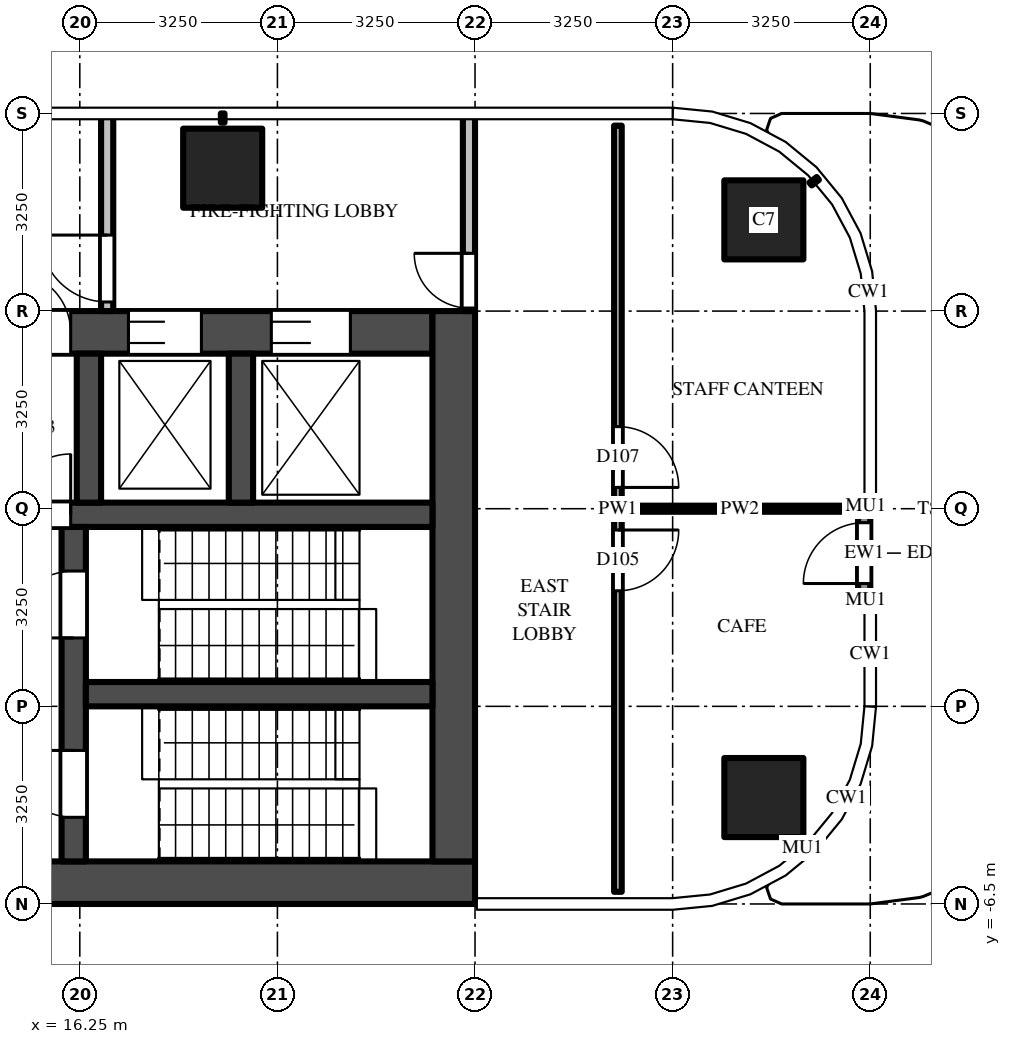
"""IFC4 building model, lengths in metres.
Left out: names, types, materials, properties, quantities, classifications, styles, units other than length and angle.
Written with IfcOpenShell. Run it as: python <this file> out.ifc"""

import sys

from ifc_helpers import new_model, si_unit, direction, frame, frame_2d, origin, origin_2d, place, context, subcontext, project, spatial, rectangle, extrude, source, transform, mapped, element, fill, save


model = new_model("IFC4")
c1 = context("Model", 3, precision=1e-05, world=origin(), true_north=direction((0.0, 1.0)))
c2 = subcontext(c1, "Body", "Model", "MODEL_VIEW")
j1 = project(units=[si_unit("LENGTHUNIT", "METRE"), si_unit("PLANEANGLEUNIT", "RADIAN")], contexts=[c1])
p1 = place(None, origin())
s1 = spatial("IfcSite", under=j1, at=p1, CompositionType="ELEMENT")
p2 = place(p1, origin())
s2 = spatial("IfcBuilding", under=s1, at=p2, CompositionType="ELEMENT")
p3 = place(p2, frame((0.0, 0.0, 97.5)))
s3 = spatial("IfcBuildingStorey", under=s2, at=p3, CompositionType="ELEMENT", Elevation=97.5)
m1 = source(origin(), c2, "Body", "SweptSolid", [
    extrude(rectangle(XDim=1.3, YDim=1.3, at=origin_2d()), origin(), (0.0, 0.0, 1.0), 4.5),
])
for number, where, z_axis, x_axis in (
    (1, (18.6, 5.6, 0.0), (0.0, 0.0, 1.0), (1.0, 0.0, 0.0)),
    (2, (27.5, 4.75, 0.0), (0.0, 0.0, 1.0), (1.0, 0.0, 0.0)),
    (3, (27.5, -4.75, 0.0), (0.0, 0.0, 1.0), (1.0, 0.0, 0.0)),
):
    element("IfcColumn", number, at=place(p3, frame(where, z_axis=z_axis, x_axis=x_axis)), inside=s3, PredefinedType="COLUMN", context=c2, shape_type="MappedRepresentation", body=[
        mapped(m1, transform((0.0, 0.0, 0.0))),
    ])
m2 = source(origin(), c2, "Body", "SweptSolid", [
    extrude(rectangle(XDim=16.5, YDim=0.7, at=frame_2d((8.25, 0.0))), origin(), (0.0, 0.0, 1.0), 4.25),
])
p4 = place(p3, frame((6.25, -6.15, 0.0), z_axis=(0.0, 0.0, 1.0), x_axis=(1.0, 0.0, 0.0)))
e4 = element("IfcWall", 4, at=p4, inside=s3, PredefinedType="SHEAR", context=c2, shape_type="MappedRepresentation", body=[
    mapped(m2, transform((0.0, 0.0, 0.0))),
])
m3 = source(origin(), c2, "Body", "SweptSolid", [
    extrude(rectangle(XDim=14.85, YDim=0.7, at=frame_2d((7.425, 0.0))), origin(), (0.0, 0.0, 1.0), 4.25),
])
p5 = place(p3, frame((7.2, 2.9, 0.0), z_axis=(0.0, 0.0, 1.0), x_axis=(1.0, 0.0, 0.0)))
e5 = element("IfcWall", 5, at=p5, inside=s3, PredefinedType="SHEAR", context=c2, shape_type="MappedRepresentation", body=[
    mapped(m3, transform((0.0, 0.0, 0.0))),
])
m4 = source(origin(), c2, "Body", "SweptSolid", [
    extrude(rectangle(XDim=1.3, YDim=2.1, at=frame_2d((0.65, 1.05))), frame((0.0, 0.36, 0.0), z_axis=(0.0, -1.0, 0.0), x_axis=(1.0, 0.0, 0.0)), (0.0, 0.0, 1.0), 0.72),
])
p6 = place(p5, frame((12.2, 0.0, 0.0)))
e6 = element("IfcOpeningElement", 6, at=p6, cuts=e5, PredefinedType="OPENING", context=c2, shape_type="MappedRepresentation", body=[
    mapped(m4, transform((0.0, 0.0, 0.0))),
])
m5 = source(origin(), c2, "Body", "SweptSolid", [
    extrude(rectangle(XDim=1.2, YDim=2.1, at=frame_2d((0.6, 1.05))), frame((0.0, 0.36, 0.0), z_axis=(0.0, -1.0, 0.0), x_axis=(1.0, 0.0, 0.0)), (0.0, 0.0, 1.0), 0.72),
])
p7 = place(p5, frame((9.85, 0.0, 0.0)))
e7 = element("IfcOpeningElement", 7, at=p7, cuts=e5, PredefinedType="OPENING", context=c2, shape_type="MappedRepresentation", body=[
    mapped(m5, transform((0.0, 0.0, 0.0))),
])
m6 = source(origin(), c2, "Body", "SweptSolid", [
    extrude(rectangle(XDim=1.0, YDim=2.1, at=frame_2d((0.5, 1.05))), frame((0.0, 0.36, 0.0), z_axis=(0.0, -1.0, 0.0), x_axis=(1.0, 0.0, 0.0)), (0.0, 0.0, 1.0), 0.72),
])
p8 = place(p5, frame((7.9, 0.0, 0.0)))
e8 = element("IfcOpeningElement", 8, at=p8, cuts=e5, PredefinedType="OPENING", context=c2, shape_type="MappedRepresentation", body=[
    mapped(m6, transform((0.0, 0.0, 0.0))),
])
m7 = source(origin(), c2, "Body", "SweptSolid", [
    extrude(rectangle(XDim=0.9, YDim=2.1, at=frame_2d((0.45, 1.05))), frame((0.0, 0.36, 0.0), z_axis=(0.0, -1.0, 0.0), x_axis=(1.0, 0.0, 0.0)), (0.0, 0.0, 1.0), 0.72),
])
p9 = place(p5, frame((0.65, 0.0, 0.0)))
e9 = element("IfcOpeningElement", 9, at=p9, cuts=e5, PredefinedType="OPENING", context=c2, shape_type="MappedRepresentation", body=[
    mapped(m7, transform((0.0, 0.0, 0.0))),
])
p10 = place(p5, frame((3.25, 0.0, 0.0)))
e10 = element("IfcOpeningElement", 10, at=p10, cuts=e5, PredefinedType="OPENING", context=c2, shape_type="MappedRepresentation", body=[
    mapped(m7, transform((0.0, 0.0, 0.0))),
])
p11 = place(p5, frame((5.8, 0.0, 0.0)))
e11 = element("IfcOpeningElement", 11, at=p11, cuts=e5, PredefinedType="OPENING", context=c2, shape_type="MappedRepresentation", body=[
    mapped(m6, transform((0.0, 0.0, 0.0))),
])
m8 = source(origin(), c2, "Body", "SweptSolid", [
    extrude(rectangle(XDim=9.05, YDim=0.7, at=frame_2d((4.525, 0.0))), origin(), (0.0, 0.0, 1.0), 4.25),
])
p12 = place(p3, frame((22.4, -5.8, 0.0), z_axis=(0.0, 0.0, 1.0), x_axis=(0.0, 1.0, 0.0)))
e12 = element("IfcWall", 12, at=p12, inside=s3, PredefinedType="SHEAR", context=c2, shape_type="MappedRepresentation", body=[
    mapped(m8, transform((0.0, 0.0, 0.0))),
])
m9 = source(origin(), c2, "Body", "SweptSolid", [
    extrude(rectangle(XDim=14.85, YDim=0.4, at=frame_2d((7.425, 0.0))), origin(), (0.0, 0.0, 1.0), 4.25),
])
p13 = place(p3, frame((7.2, -0.1, 0.0), z_axis=(0.0, 0.0, 1.0), x_axis=(1.0, 0.0, 0.0)))
e13 = element("IfcWall", 13, at=p13, inside=s3, PredefinedType="SHEAR", context=c2, shape_type="MappedRepresentation", body=[
    mapped(m9, transform((0.0, 0.0, 0.0))),
])
m10 = source(origin(), c2, "Body", "SweptSolid", [
    extrude(rectangle(XDim=1.0, YDim=2.1, at=frame_2d((0.5, 1.05))), frame((0.0, 0.21, 0.0), z_axis=(0.0, -1.0, 0.0), x_axis=(1.0, 0.0, 0.0)), (0.0, 0.0, 1.0), 0.42),
])
p14 = place(p13, frame((7.9, 0.0, 0.0)))
e14 = element("IfcOpeningElement", 14, at=p14, cuts=e13, PredefinedType="OPENING", context=c2, shape_type="MappedRepresentation", body=[
    mapped(m10, transform((0.0, 0.0, 0.0))),
])
m11 = source(origin(), c2, "Body", "SweptSolid", [
    extrude(rectangle(XDim=5.5, YDim=0.4, at=frame_2d((2.75, 0.0))), origin(), (0.0, 0.0, 1.0), 4.25),
])
p15 = place(p3, frame((16.15, -5.8, 0.0), z_axis=(0.0, 0.0, 1.0), x_axis=(0.0, 1.0, 0.0)))
e15 = element("IfcWall", 15, at=p15, inside=s3, PredefinedType="SHEAR", context=c2, shape_type="MappedRepresentation", body=[
    mapped(m11, transform((0.0, 0.0, 0.0))),
])
m12 = source(origin(), c2, "Body", "SweptSolid", [
    extrude(rectangle(XDim=1.1, YDim=2.1, at=frame_2d((0.55, 1.05))), frame((0.0, 0.21, 0.0), z_axis=(0.0, -1.0, 0.0), x_axis=(1.0, 0.0, 0.0)), (0.0, 0.0, 1.0), 0.42),
])
p16 = place(p15, frame((0.725, 0.0, 0.0)))
e16 = element("IfcOpeningElement", 16, at=p16, cuts=e15, PredefinedType="OPENING", context=c2, shape_type="MappedRepresentation", body=[
    mapped(m12, transform((0.0, 0.0, 0.0))),
])
p17 = place(p15, frame((3.675, 0.0, 0.0)))
e17 = element("IfcOpeningElement", 17, at=p17, cuts=e15, PredefinedType="OPENING", context=c2, shape_type="MappedRepresentation", body=[
    mapped(m12, transform((0.0, 0.0, 0.0))),
])
m13 = source(origin(), c2, "Body", "SweptSolid", [
    extrude(rectangle(XDim=5.7, YDim=0.4, at=frame_2d((2.85, 0.0))), origin(), (0.0, 0.0, 1.0), 4.25),
])
p18 = place(p3, frame((16.35, -3.05, 0.0), z_axis=(0.0, 0.0, 1.0), x_axis=(1.0, 0.0, 0.0)))
e18 = element("IfcWall", 18, at=p18, inside=s3, PredefinedType="SHEAR", context=c2, shape_type="MappedRepresentation", body=[
    mapped(m13, transform((0.0, 0.0, 0.0))),
])
m14 = source(origin(), c2, "Body", "SweptSolid", [
    extrude(rectangle(XDim=2.45, YDim=0.4, at=frame_2d((1.225, 0.0))), origin(), (0.0, 0.0, 1.0), 4.25),
])
for number, where, z_axis, x_axis in (
    (19, (16.4, 0.1, 0.0), (0.0, 0.0, 1.0), (0.0, 1.0, 0.0)),
    (20, (18.9, 0.1, 0.0), (0.0, 0.0, 1.0), (0.0, 1.0, 0.0)),
):
    element("IfcWall", number, at=place(p3, frame(where, z_axis=z_axis, x_axis=x_axis)), inside=s3, PredefinedType="SHEAR", context=c2, shape_type="MappedRepresentation", body=[
        mapped(m14, transform((0.0, 0.0, 0.0))),
    ])
m15 = source(origin(), c2, "Body", "SweptSolid", [
    extrude(rectangle(XDim=3.25, YDim=0.2, at=frame_2d((1.625, 0.0))), origin(), (0.0, 0.0, 1.0), 4.25),
])
p19 = place(p3, frame((16.7, 3.25, 0.0), z_axis=(0.0, 0.0, 1.0), x_axis=(0.0, 1.0, 0.0)))
e21 = element("IfcWall", 21, at=p19, inside=s3, PredefinedType="PARTITIONING", context=c2, shape_type="MappedRepresentation", body=[
    mapped(m15, transform((0.0, 0.0, 0.0))),
])
m16 = source(origin(), c2, "Body", "SweptSolid", [
    extrude(rectangle(XDim=1.1, YDim=2.1, at=frame_2d((0.55, 1.05))), frame((0.0, 0.11, 0.0), z_axis=(0.0, -1.0, 0.0), x_axis=(1.0, 0.0, 0.0)), (0.0, 0.0, 1.0), 0.22),
])
p20 = place(p19, frame((0.15, 0.0, 0.0)))
e22 = element("IfcOpeningElement", 22, at=p20, cuts=e21, PredefinedType="OPENING", context=c2, shape_type="MappedRepresentation", body=[
    mapped(m16, transform((0.0, 0.0, 0.0))),
])
p21 = place(p3, frame((22.65, 3.25, 0.0), z_axis=(0.0, 0.0, 1.0), x_axis=(0.0, 1.0, 0.0)))
e23 = element("IfcWall", 23, at=p21, inside=s3, PredefinedType="PARTITIONING", context=c2, shape_type="MappedRepresentation", body=[
    mapped(m15, transform((0.0, 0.0, 0.0))),
])
m17 = source(origin(), c2, "Body", "SweptSolid", [
    extrude(rectangle(XDim=0.9, YDim=2.1, at=frame_2d((0.45, 1.05))), frame((0.0, 0.11, 0.0), z_axis=(0.0, -1.0, 0.0), x_axis=(1.0, 0.0, 0.0)), (0.0, 0.0, 1.0), 0.22),
])
p22 = place(p21, frame((0.05, 0.0, 0.0)))
e24 = element("IfcOpeningElement", 24, at=p22, cuts=e23, PredefinedType="OPENING", context=c2, shape_type="MappedRepresentation", body=[
    mapped(m17, transform((0.0, 0.0, 0.0))),
])
m18 = source(origin(), c2, "Body", "SweptSolid", [
    extrude(rectangle(XDim=1.5, YDim=0.2, at=frame_2d((0.75, 0.0))), origin(), (0.0, 0.0, 1.0), 4.25),
])
p23 = place(p3, frame((29.15, -1.48, 0.0), z_axis=(0.0, 0.0, 1.0), x_axis=(0.0, 1.0, 0.0)))
e25 = element("IfcWall", 25, at=p23, inside=s3, PredefinedType="SOLIDWALL", context=c2, shape_type="MappedRepresentation", body=[
    mapped(m18, transform((0.0, 0.0, 0.0))),
])
m19 = source(origin(), c2, "Body", "SweptSolid", [
    extrude(rectangle(XDim=1.0, YDim=2.4, at=frame_2d((0.5, 1.2))), frame((0.0, 0.11, 0.0), z_axis=(0.0, -1.0, 0.0), x_axis=(1.0, 0.0, 0.0)), (0.0, 0.0, 1.0), 0.22),
])
p24 = place(p23, frame((0.25, 0.0, 0.0)))
e26 = element("IfcOpeningElement", 26, at=p24, cuts=e25, PredefinedType="OPENING", context=c2, shape_type="MappedRepresentation", body=[
    mapped(m19, transform((0.0, 0.0, 0.0))),
])
m20 = source(origin(), c2, "Body", "SweptSolid", [
    extrude(rectangle(XDim=12.6, YDim=0.125, at=frame_2d((6.3, 0.0))), origin(), (0.0, 0.0, 1.0), 3.33),
])
p25 = place(p3, frame((25.1, 6.3, 0.0), z_axis=(0.0, 0.0, 1.0), x_axis=(0.0, -1.0, 0.0)))
e27 = element("IfcWall", 27, at=p25, inside=s3, PredefinedType="PARTITIONING", context=c2, shape_type="MappedRepresentation", body=[
    mapped(m20, transform((0.0, 0.0, 0.0))),
])
m21 = source(origin(), c2, "Body", "SweptSolid", [
    extrude(rectangle(XDim=1.0, YDim=2.1, at=frame_2d((0.5, 1.05))), frame((0.0, 0.073, 0.0), z_axis=(0.0, -1.0, 0.0), x_axis=(1.0, 0.0, 0.0)), (0.0, 0.0, 1.0), 0.145),
])
p26 = place(p25, frame((6.65, 0.0, 0.0)))
e28 = element("IfcOpeningElement", 28, at=p26, cuts=e27, PredefinedType="OPENING", context=c2, shape_type="MappedRepresentation", body=[
    mapped(m21, transform((0.0, 0.0, 0.0))),
])
p27 = place(p25, frame((4.95, 0.0, 0.0)))
e29 = element("IfcOpeningElement", 29, at=p27, cuts=e27, PredefinedType="OPENING", context=c2, shape_type="MappedRepresentation", body=[
    mapped(m21, transform((0.0, 0.0, 0.0))),
])
m22 = source(origin(), c2, "Body", "SweptSolid", [
    extrude(rectangle(XDim=3.887, YDim=0.1, at=frame_2d((1.944, 0.0))), origin(), (0.0, 0.0, 1.0), 3.33),
])
p28 = place(p3, frame((25.163, 0.0, 0.0), z_axis=(0.0, 0.0, 1.0), x_axis=(1.0, 0.0, 0.0)))
e30 = element("IfcWall", 30, at=p28, inside=s3, PredefinedType="PARTITIONING", context=c2, shape_type="MappedRepresentation", body=[
    mapped(m22, transform((0.0, 0.0, 0.0))),
])
m23 = source(origin(), c2, "Body", "SweptSolid", [
    extrude(rectangle(XDim=1.3, YDim=2.1, at=frame_2d((0.65, 1.05))), frame((0.0, -0.275, 0.0), z_axis=(0.0, -1.0, 0.0), x_axis=(1.0, 0.0, 0.0)), (0.0, 0.0, 1.0), 0.05),
])
p29 = place(p6, origin())
e31 = element("IfcDoor", 31, at=p29, inside=s3, OperationType="DOUBLE_DOOR_SLIDING", PredefinedType="DOOR", context=c2, shape_type="MappedRepresentation", body=[
    mapped(m23, transform((0.0, 0.0, 0.0))),
])
fill(e6, e31)
m24 = source(origin(), c2, "Body", "SweptSolid", [
    extrude(rectangle(XDim=1.2, YDim=2.1, at=frame_2d((0.6, 1.05))), frame((0.0, -0.275, 0.0), z_axis=(0.0, -1.0, 0.0), x_axis=(1.0, 0.0, 0.0)), (0.0, 0.0, 1.0), 0.05),
])
p30 = place(p7, origin())
e32 = element("IfcDoor", 32, at=p30, inside=s3, OperationType="DOUBLE_DOOR_SLIDING", PredefinedType="DOOR", context=c2, shape_type="MappedRepresentation", body=[
    mapped(m24, transform((0.0, 0.0, 0.0))),
])
fill(e7, e32)
m25 = source(origin(), c2, "Body", "SweptSolid", [
    extrude(rectangle(XDim=1.1, YDim=2.1, at=frame_2d((0.55, 1.05))), frame((0.0, 0.025, 0.0), z_axis=(0.0, -1.0, 0.0), x_axis=(1.0, 0.0, 0.0)), (0.0, 0.0, 1.0), 0.05),
])
p31 = place(p16, origin())
e33 = element("IfcDoor", 33, at=p31, inside=s3, OperationType="SINGLE_SWING_RIGHT", PredefinedType="DOOR", context=c2, shape_type="MappedRepresentation", body=[
    mapped(m25, transform((0.0, 0.0, 0.0))),
])
fill(e16, e33)
p32 = place(p17, origin())
e34 = element("IfcDoor", 34, at=p32, inside=s3, OperationType="SINGLE_SWING_LEFT", PredefinedType="DOOR", context=c2, shape_type="MappedRepresentation", body=[
    mapped(m25, transform((0.0, 0.0, 0.0))),
])
fill(e17, e34)
m26 = source(origin(), c2, "Body", "SweptSolid", [
    extrude(rectangle(XDim=1.0, YDim=2.1, at=frame_2d((0.5, 1.05))), frame((0.0, 0.025, 0.0), z_axis=(0.0, -1.0, 0.0), x_axis=(1.0, 0.0, 0.0)), (0.0, 0.0, 1.0), 0.05),
])
p33 = place(p14, origin())
e35 = element("IfcDoor", 35, at=p33, inside=s3, OperationType="SINGLE_SWING_RIGHT", PredefinedType="DOOR", context=c2, shape_type="MappedRepresentation", body=[
    mapped(m26, transform((0.0, 0.0, 0.0))),
])
fill(e14, e35)
m27 = source(origin(), c2, "Body", "SweptSolid", [
    extrude(rectangle(XDim=1.0, YDim=2.1, at=frame_2d((0.5, 1.05))), frame((0.0, -0.275, 0.0), z_axis=(0.0, -1.0, 0.0), x_axis=(1.0, 0.0, 0.0)), (0.0, 0.0, 1.0), 0.05),
])
p34 = place(p8, origin())
e36 = element("IfcDoor", 36, at=p34, inside=s3, OperationType="SINGLE_SWING_LEFT", PredefinedType="DOOR", context=c2, shape_type="MappedRepresentation", body=[
    mapped(m27, transform((0.0, 0.0, 0.0))),
])
fill(e8, e36)
p35 = place(p20, origin())
e37 = element("IfcDoor", 37, at=p35, inside=s3, OperationType="SINGLE_SWING_RIGHT", PredefinedType="DOOR", context=c2, shape_type="MappedRepresentation", body=[
    mapped(m25, transform((0.0, 0.0, 0.0))),
])
fill(e22, e37)
m28 = source(origin(), c2, "Body", "SweptSolid", [
    extrude(rectangle(XDim=0.9, YDim=2.1, at=frame_2d((0.45, 1.05))), frame((0.0, 0.025, 0.0), z_axis=(0.0, -1.0, 0.0), x_axis=(1.0, 0.0, 0.0)), (0.0, 0.0, 1.0), 0.05),
])
p36 = place(p22, origin())
e38 = element("IfcDoor", 38, at=p36, inside=s3, OperationType="SINGLE_SWING_RIGHT", PredefinedType="DOOR", context=c2, shape_type="MappedRepresentation", body=[
    mapped(m28, transform((0.0, 0.0, 0.0))),
])
fill(e24, e38)
m29 = source(origin(), c2, "Body", "SweptSolid", [
    extrude(rectangle(XDim=1.0, YDim=2.4, at=frame_2d((0.5, 1.2))), frame((0.0, 0.025, 0.0), z_axis=(0.0, -1.0, 0.0), x_axis=(1.0, 0.0, 0.0)), (0.0, 0.0, 1.0), 0.05),
])
p37 = place(p24, origin())
e39 = element("IfcDoor", 39, at=p37, inside=s3, OperationType="SINGLE_SWING_LEFT", PredefinedType="DOOR", context=c2, shape_type="MappedRepresentation", body=[
    mapped(m29, transform((0.0, 0.0, 0.0))),
])
fill(e26, e39)
p38 = place(p26, origin())
e40 = element("IfcDoor", 40, at=p38, inside=s3, OperationType="SINGLE_SWING_LEFT", PredefinedType="DOOR", context=c2, shape_type="MappedRepresentation", body=[
    mapped(m26, transform((0.0, 0.0, 0.0))),
])
fill(e28, e40)
p39 = place(p27, origin())
e41 = element("IfcDoor", 41, at=p39, inside=s3, OperationType="SINGLE_SWING_RIGHT", PredefinedType="DOOR", context=c2, shape_type="MappedRepresentation", body=[
    mapped(m26, transform((0.0, 0.0, 0.0))),
])
fill(e29, e41)
save(model, sys.argv[1])
